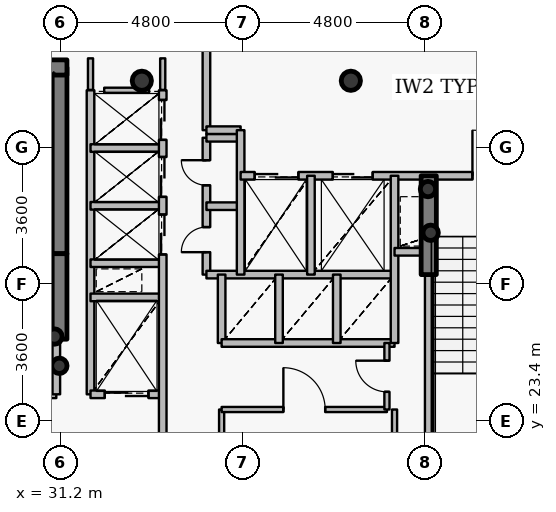
"""IFC4 building model, lengths in metres.
Left out: names, types, materials, properties, quantities, classifications, styles, units other than length and angle.
Written with IfcOpenShell. Run it as: python <this file> out.ifc"""

import sys

from ifc_helpers import new_model, si_unit, direction, frame, frame_2d, origin, origin_2d, place, context, subcontext, project, spatial, rectangle, hollow_circle, extrude, source, transform, mapped, element, fill, save


model = new_model("IFC4")
c1 = context("Model", 3, precision=1e-05, world=origin(), true_north=direction((0.0, 1.0)))
c2 = subcontext(c1, "Body", "Model", "MODEL_VIEW")
j1 = project(units=[si_unit("LENGTHUNIT", "METRE"), si_unit("PLANEANGLEUNIT", "RADIAN")], contexts=[c1])
p1 = place(None, origin())
s1 = spatial("IfcSite", under=j1, at=p1, CompositionType="ELEMENT")
p2 = place(p1, origin())
s2 = spatial("IfcBuilding", under=s1, at=p2, CompositionType="ELEMENT")
p3 = place(p2, frame((0.0, 0.0, 174.9)))
s3 = spatial("IfcBuildingStorey", under=s2, at=p3, CompositionType="ELEMENT", Elevation=174.9)
for number, where, z_axis, x_axis in (
    (1, (38.85, 32.35, 0.0), (0.0, 0.0, 1.0), (1.0, 0.0, 0.0)),
    (2, (33.35, 32.35, 0.0), (0.0, 0.0, 1.0), (1.0, 0.0, 0.0)),
):
    element("IfcColumn", number, at=place(p3, frame(where, z_axis=z_axis, x_axis=x_axis)), inside=s3, PredefinedType="COLUMN", context=c2, shape_type="SweptSolid", body=[
        extrude(hollow_circle(Radius=0.254, WallThickness=0.02, at=origin_2d()), origin(), (0.0, 0.0, 1.0), 3.75),
    ])
p4 = place(p3, frame((31.18, 27.8, 0.0), z_axis=(0.0, 0.0, 1.0), x_axis=(0.0, 1.0, 0.0)))
e3 = element("IfcWall", 3, at=p4, inside=s3, PredefinedType="SHEAR", context=c2, shape_type="SweptSolid", body=[
    extrude(rectangle(XDim=4.9, YDim=0.4, at=frame_2d((2.45, 0.0))), origin(), (0.0, 0.0, 1.0), 3.75),
])
p5 = place(p3, frame((27.28, 32.7, 0.0), z_axis=(0.0, 0.0, 1.0), x_axis=(1.0, 0.0, 0.0)))
e4 = element("IfcWall", 4, at=p5, inside=s3, PredefinedType="SHEAR", context=c2, shape_type="SweptSolid", body=[
    extrude(rectangle(XDim=4.1, YDim=0.4, at=frame_2d((2.05, 0.0))), origin(), (0.0, 0.0, 1.0), 3.75),
])
for number, where, z_axis, x_axis in (
    (5, (31.05, 25.62, 0.0), (0.0, 0.0, 1.0), (1.0, 0.0, 0.0)),
    (6, (31.18, 24.85, 0.0), (0.0, 0.0, 1.0), (1.0, 0.0, 0.0)),
    (7, (40.95, 28.35, 0.0), (0.0, 0.0, 1.0), (1.0, 0.0, 0.0)),
    (8, (40.88, 29.5, 0.0), (0.0, 0.0, 1.0), (1.0, 0.0, 0.0)),
):
    element("IfcColumn", number, at=place(p3, frame(where, z_axis=z_axis, x_axis=x_axis)), inside=s3, PredefinedType="COLUMN", context=c2, shape_type="SweptSolid", body=[
        extrude(hollow_circle(Radius=0.203, WallThickness=0.016, at=origin_2d()), origin(), (0.0, 0.0, 1.0), 3.75),
    ])
p6 = place(p3, frame((31.18, 25.55, 0.0), z_axis=(0.0, 0.0, 1.0), x_axis=(0.0, 1.0, 0.0)))
e9 = element("IfcWall", 9, at=p6, inside=s3, PredefinedType="SHEAR", context=c2, shape_type="SweptSolid", body=[
    extrude(rectangle(XDim=2.25, YDim=0.4, at=frame_2d((1.125, 0.0))), origin(), (0.0, 0.0, 1.0), 3.1),
])
p7 = place(p3, frame((40.9, 27.25, 0.0), z_axis=(0.0, 0.0, 1.0), x_axis=(0.0, 1.0, 0.0)))
e10 = element("IfcWall", 10, at=p7, inside=s3, PredefinedType="SHEAR", context=c2, shape_type="SweptSolid", body=[
    extrude(rectangle(XDim=2.6, YDim=0.4, at=frame_2d((1.3, 0.0))), origin(), (0.0, 0.0, 1.0), 3.1),
])
p8 = place(p3, frame((27.56, 24.1, 0.0), z_axis=(0.0, 0.0, 1.0), x_axis=(1.0, 0.0, 0.0)))
e11 = element("IfcWall", 11, at=p8, inside=s3, PredefinedType="PARTITIONING", context=c2, shape_type="SweptSolid", body=[
    extrude(rectangle(XDim=3.54, YDim=0.2, at=frame_2d((1.77, 0.0))), origin(), (0.0, 0.0, 1.0), 3.5),
])
p9 = place(p8, frame((1.17, 0.0, 0.0)))
e12 = element("IfcOpeningElement", 12, at=p9, cuts=e11, PredefinedType="OPENING", context=c2, shape_type="SweptSolid", body=[
    extrude(rectangle(XDim=1.2, YDim=2.15, at=origin_2d()), frame((0.6, 0.11, 1.075), z_axis=(0.0, -1.0, 0.0), x_axis=(1.0, 0.0, 0.0)), (0.0, 0.0, 1.0), 0.22),
])
p10 = place(p3, frame((31.1, 24.1, 0.0), z_axis=(0.0, 0.0, 1.0), x_axis=(0.0, 1.0, 0.0)))
e13 = element("IfcWall", 13, at=p10, inside=s3, PredefinedType="PARTITIONING", context=c2, shape_type="SweptSolid", body=[
    extrude(rectangle(XDim=1.44, YDim=0.2, at=frame_2d((0.72, 0.0))), origin(), (0.0, 0.0, 1.0), 3.5),
])
p11 = place(p3, frame((32.0, 24.1, 0.0), z_axis=(0.0, 0.0, 1.0), x_axis=(0.0, 1.0, 0.0)))
e14 = element("IfcWall", 14, at=p11, inside=s3, PredefinedType="PARTITIONING", context=c2, shape_type="SweptSolid", body=[
    extrude(rectangle(XDim=8.0, YDim=0.2, at=frame_2d((4.0, 0.0))), origin(), (0.0, 0.0, 1.0), 3.5),
])
p12 = place(p3, frame((32.0, 24.1, 0.0), z_axis=(0.0, 0.0, 1.0), x_axis=(1.0, 0.0, 0.0)))
e15 = element("IfcWall", 15, at=p12, inside=s3, PredefinedType="PARTITIONING", context=c2, shape_type="SweptSolid", body=[
    extrude(rectangle(XDim=1.9, YDim=0.2, at=frame_2d((0.95, 0.0))), origin(), (0.0, 0.0, 1.0), 3.085),
])
p13 = place(p12, frame((0.375, 0.0, 0.0)))
e16 = element("IfcOpeningElement", 16, at=p13, cuts=e15, PredefinedType="OPENING", context=c2, shape_type="SweptSolid", body=[
    extrude(rectangle(XDim=1.15, YDim=2.15, at=origin_2d()), frame((0.575, 0.11, 1.075), z_axis=(0.0, -1.0, 0.0), x_axis=(1.0, 0.0, 0.0)), (0.0, 0.0, 1.0), 0.22),
])
for number, where, z_axis, x_axis in (
    (17, (32.0, 26.65, 0.0), (0.0, 0.0, 1.0), (1.0, 0.0, 0.0)),
    (18, (32.0, 27.55, 0.0), (0.0, 0.0, 1.0), (1.0, 0.0, 0.0)),
    (19, (32.0, 29.06, 0.0), (0.0, 0.0, 1.0), (1.0, 0.0, 0.0)),
    (20, (32.0, 30.58, 0.0), (0.0, 0.0, 1.0), (1.0, 0.0, 0.0)),
):
    element("IfcWall", number, at=place(p3, frame(where, z_axis=z_axis, x_axis=x_axis)), inside=s3, PredefinedType="PARTITIONING", context=c2, shape_type="SweptSolid", body=[
        extrude(rectangle(XDim=1.9, YDim=0.2, at=frame_2d((0.95, 0.0))), origin(), (0.0, 0.0, 1.0), 3.085),
    ])
p14 = place(p3, frame((33.9, 20.8, 0.0), z_axis=(0.0, 0.0, 1.0), x_axis=(0.0, 1.0, 0.0)))
e21 = element("IfcWall", 21, at=p14, inside=s3, PredefinedType="PARTITIONING", context=c2, shape_type="SweptSolid", body=[
    extrude(rectangle(XDim=11.3, YDim=0.2, at=frame_2d((5.65, 0.0))), origin(), (0.0, 0.0, 1.0), 3.085),
])
p15 = place(p14, frame((6.98, 0.0, 0.0)))
e22 = element("IfcOpeningElement", 22, at=p15, cuts=e21, PredefinedType="OPENING", context=c2, shape_type="SweptSolid", body=[
    extrude(rectangle(XDim=1.05, YDim=2.15, at=origin_2d()), frame((0.525, 0.11, 1.075), z_axis=(0.0, -1.0, 0.0), x_axis=(1.0, 0.0, 0.0)), (0.0, 0.0, 1.0), 0.22),
])
p16 = place(p14, frame((8.495, 0.0, 0.0)))
e23 = element("IfcOpeningElement", 23, at=p16, cuts=e21, PredefinedType="OPENING", context=c2, shape_type="SweptSolid", body=[
    extrude(rectangle(XDim=1.05, YDim=2.15, at=origin_2d()), frame((0.525, 0.11, 1.075), z_axis=(0.0, -1.0, 0.0), x_axis=(1.0, 0.0, 0.0)), (0.0, 0.0, 1.0), 0.22),
])
p17 = place(p14, frame((9.995, 0.0, 0.0)))
e24 = element("IfcOpeningElement", 24, at=p17, cuts=e21, PredefinedType="OPENING", context=c2, shape_type="SweptSolid", body=[
    extrude(rectangle(XDim=1.05, YDim=2.15, at=origin_2d()), frame((0.525, 0.11, 1.075), z_axis=(0.0, -1.0, 0.0), x_axis=(1.0, 0.0, 0.0)), (0.0, 0.0, 1.0), 0.22),
])
p18 = place(p3, frame((35.05, 27.25, 0.0), z_axis=(0.0, 0.0, 1.0), x_axis=(0.0, 1.0, 0.0)))
e25 = element("IfcWall", 25, at=p18, inside=s3, PredefinedType="PARTITIONING", context=c2, shape_type="SweptSolid", body=[
    extrude(rectangle(XDim=3.6, YDim=0.2, at=frame_2d((1.8, 0.0))), origin(), (0.0, 0.0, 1.0), 3.5),
])
p19 = place(p18, frame((0.59, 0.0, 0.0)))
e26 = element("IfcOpeningElement", 26, at=p19, cuts=e25, PredefinedType="OPENING", context=c2, shape_type="SweptSolid", body=[
    extrude(rectangle(XDim=0.66, YDim=2.05, at=origin_2d()), frame((0.33, 0.11, 1.025), z_axis=(0.0, -1.0, 0.0), x_axis=(1.0, 0.0, 0.0)), (0.0, 0.0, 1.0), 0.22),
])
p20 = place(p18, frame((2.35, 0.0, 0.0)))
e27 = element("IfcOpeningElement", 27, at=p20, cuts=e25, PredefinedType="OPENING", context=c2, shape_type="SweptSolid", body=[
    extrude(rectangle(XDim=0.66, YDim=2.05, at=origin_2d()), frame((0.33, 0.11, 1.025), z_axis=(0.0, -1.0, 0.0), x_axis=(1.0, 0.0, 0.0)), (0.0, 0.0, 1.0), 0.22),
])
p21 = place(p3, frame((35.05, 27.25, 0.0), z_axis=(0.0, 0.0, 1.0), x_axis=(1.0, 0.0, 0.0)))
e28 = element("IfcWall", 28, at=p21, inside=s3, PredefinedType="PARTITIONING", context=c2, shape_type="SweptSolid", body=[
    extrude(rectangle(XDim=4.95, YDim=0.2, at=frame_2d((2.475, 0.0))), origin(), (0.0, 0.0, 1.0), 3.085),
])
for number, where, z_axis, x_axis in (
    (29, (35.05, 29.05, 0.0), (0.0, 0.0, 1.0), (1.0, 0.0, 0.0)),
    (30, (35.05, 30.85, 0.0), (0.0, 0.0, 1.0), (1.0, 0.0, 0.0)),
):
    element("IfcWall", number, at=place(p3, frame(where, z_axis=z_axis, x_axis=x_axis)), inside=s3, PredefinedType="PARTITIONING", context=c2, shape_type="SweptSolid", body=[
        extrude(rectangle(XDim=0.9, YDim=0.2, at=frame_2d((0.45, 0.0))), origin(), (0.0, 0.0, 1.0), 3.5),
    ])
p22 = place(p3, frame((35.05, 31.05, 0.0), z_axis=(0.0, 0.0, 1.0), x_axis=(0.0, 1.0, 0.0)))
e31 = element("IfcWall", 31, at=p22, inside=s3, PredefinedType="PARTITIONING", context=c2, shape_type="SweptSolid", body=[
    extrude(rectangle(XDim=2.15, YDim=0.2, at=frame_2d((1.075, 0.0))), origin(), (0.0, 0.0, 1.0), 3.085),
])
p23 = place(p3, frame((35.05, 31.05, 0.0), z_axis=(0.0, 0.0, 1.0), x_axis=(1.0, 0.0, 0.0)))
e32 = element("IfcWall", 32, at=p23, inside=s3, PredefinedType="PARTITIONING", context=c2, shape_type="SweptSolid", body=[
    extrude(rectangle(XDim=0.9, YDim=0.2, at=frame_2d((0.45, 0.0))), origin(), (0.0, 0.0, 1.0), 3.5),
])
p24 = place(p3, frame((35.45, 20.8, 0.0), z_axis=(0.0, 0.0, 1.0), x_axis=(0.0, 1.0, 0.0)))
e33 = element("IfcWall", 33, at=p24, inside=s3, PredefinedType="PARTITIONING", context=c2, shape_type="SweptSolid", body=[
    extrude(rectangle(XDim=2.9, YDim=0.135, at=frame_2d((1.45, 0.0))), origin(), (0.0, 0.0, 1.0), 3.085),
])
p25 = place(p3, frame((35.45, 23.7, 0.0), z_axis=(0.0, 0.0, 1.0), x_axis=(1.0, 0.0, 0.0)))
e34 = element("IfcWall", 34, at=p25, inside=s3, PredefinedType="PARTITIONING", context=c2, shape_type="SweptSolid", body=[
    extrude(rectangle(XDim=4.35, YDim=0.135, at=frame_2d((2.175, 0.0))), origin(), (0.0, 0.0, 1.0), 3.085),
])
p26 = place(p25, frame((1.625, 0.0, 0.0)))
e35 = element("IfcOpeningElement", 35, at=p26, cuts=e34, PredefinedType="OPENING", context=c2, shape_type="SweptSolid", body=[
    extrude(rectangle(XDim=1.1, YDim=2.15, at=origin_2d()), frame((0.55, 0.078, 1.075), z_axis=(0.0, -1.0, 0.0), x_axis=(1.0, 0.0, 0.0)), (0.0, 0.0, 1.0), 0.155),
])
p27 = place(p3, frame((35.45, 25.45, 0.0), z_axis=(0.0, 0.0, 1.0), x_axis=(0.0, 1.0, 0.0)))
e36 = element("IfcWall", 36, at=p27, inside=s3, PredefinedType="PARTITIONING", context=c2, shape_type="SweptSolid", body=[
    extrude(rectangle(XDim=1.8, YDim=0.2, at=frame_2d((0.9, 0.0))), origin(), (0.0, 0.0, 1.0), 3.5),
])
p28 = place(p3, frame((35.45, 25.45, 0.0), z_axis=(0.0, 0.0, 1.0), x_axis=(1.0, 0.0, 0.0)))
e37 = element("IfcWall", 37, at=p28, inside=s3, PredefinedType="PARTITIONING", context=c2, shape_type="SweptSolid", body=[
    extrude(rectangle(XDim=4.55, YDim=0.2, at=frame_2d((2.275, 0.0))), origin(), (0.0, 0.0, 1.0), 3.085),
])
p29 = place(p3, frame((35.95, 27.25, 0.0), z_axis=(0.0, 0.0, 1.0), x_axis=(0.0, 1.0, 0.0)))
e38 = element("IfcWall", 38, at=p29, inside=s3, PredefinedType="PARTITIONING", context=c2, shape_type="SweptSolid", body=[
    extrude(rectangle(XDim=3.8, YDim=0.2, at=frame_2d((1.9, 0.0))), origin(), (0.0, 0.0, 1.0), 3.5),
])
p30 = place(p3, frame((35.95, 29.85, 0.0), z_axis=(0.0, 0.0, 1.0), x_axis=(1.0, 0.0, 0.0)))
e39 = element("IfcWall", 39, at=p30, inside=s3, PredefinedType="PARTITIONING", context=c2, shape_type="SweptSolid", body=[
    extrude(rectangle(XDim=8.49, YDim=0.2, at=frame_2d((4.245, 0.0))), origin(), (0.0, 0.0, 1.0), 3.085),
])
p31 = place(p30, frame((6.1, 0.0, 0.0)))
e40 = element("IfcOpeningElement", 40, at=p31, cuts=e39, PredefinedType="OPENING", context=c2, shape_type="SweptSolid", body=[
    extrude(rectangle(XDim=1.2, YDim=2.15, at=origin_2d()), frame((0.6, 0.11, 1.075), z_axis=(0.0, -1.0, 0.0), x_axis=(1.0, 0.0, 0.0)), (0.0, 0.0, 1.0), 0.22),
])
p32 = place(p30, frame((0.37, 0.0, 0.0)))
e41 = element("IfcOpeningElement", 41, at=p32, cuts=e39, PredefinedType="OPENING", context=c2, shape_type="SweptSolid", body=[
    extrude(rectangle(XDim=1.15, YDim=2.15, at=origin_2d()), frame((0.575, 0.11, 1.075), z_axis=(0.0, -1.0, 0.0), x_axis=(1.0, 0.0, 0.0)), (0.0, 0.0, 1.0), 0.22),
])
p33 = place(p30, frame((2.425, 0.0, 0.0)))
e42 = element("IfcOpeningElement", 42, at=p33, cuts=e39, PredefinedType="OPENING", context=c2, shape_type="SweptSolid", body=[
    extrude(rectangle(XDim=1.05, YDim=2.15, at=origin_2d()), frame((0.525, 0.11, 1.075), z_axis=(0.0, -1.0, 0.0), x_axis=(1.0, 0.0, 0.0)), (0.0, 0.0, 1.0), 0.22),
])
p34 = place(p3, frame((36.96, 25.45, 0.0), z_axis=(0.0, 0.0, 1.0), x_axis=(0.0, 1.0, 0.0)))
e43 = element("IfcWall", 43, at=p34, inside=s3, PredefinedType="PARTITIONING", context=c2, shape_type="SweptSolid", body=[
    extrude(rectangle(XDim=1.8, YDim=0.2, at=frame_2d((0.9, 0.0))), origin(), (0.0, 0.0, 1.0), 3.5),
])
p35 = place(p3, frame((37.8, 27.25, 0.0), z_axis=(0.0, 0.0, 1.0), x_axis=(0.0, 1.0, 0.0)))
e44 = element("IfcWall", 44, at=p35, inside=s3, PredefinedType="PARTITIONING", context=c2, shape_type="SweptSolid", body=[
    extrude(rectangle(XDim=2.6, YDim=0.2, at=frame_2d((1.3, 0.0))), origin(), (0.0, 0.0, 1.0), 3.5),
])
p36 = place(p3, frame((38.48, 25.45, 0.0), z_axis=(0.0, 0.0, 1.0), x_axis=(0.0, 1.0, 0.0)))
e45 = element("IfcWall", 45, at=p36, inside=s3, PredefinedType="PARTITIONING", context=c2, shape_type="SweptSolid", body=[
    extrude(rectangle(XDim=1.8, YDim=0.2, at=frame_2d((0.9, 0.0))), origin(), (0.0, 0.0, 1.0), 3.5),
])
p37 = place(p3, frame((39.8, 23.7, 0.0), z_axis=(0.0, 0.0, 1.0), x_axis=(0.0, 1.0, 0.0)))
e46 = element("IfcWall", 46, at=p37, inside=s3, PredefinedType="PARTITIONING", context=c2, shape_type="SweptSolid", body=[
    extrude(rectangle(XDim=1.75, YDim=0.135, at=frame_2d((0.875, 0.0))), origin(), (0.0, 0.0, 1.0), 3.5),
])
p38 = place(p37, frame((0.465, 0.0, 0.0)))
e47 = element("IfcOpeningElement", 47, at=p38, cuts=e46, PredefinedType="OPENING", context=c2, shape_type="SweptSolid", body=[
    extrude(rectangle(XDim=0.82, YDim=2.1, at=origin_2d()), frame((0.41, 0.078, 1.05), z_axis=(0.0, -1.0, 0.0), x_axis=(1.0, 0.0, 0.0)), (0.0, 0.0, 1.0), 0.155),
])
p39 = place(p3, frame((40.0, 25.45, 0.0), z_axis=(0.0, 0.0, 1.0), x_axis=(0.0, 1.0, 0.0)))
e48 = element("IfcWall", 48, at=p39, inside=s3, PredefinedType="PARTITIONING", context=c2, shape_type="SweptSolid", body=[
    extrude(rectangle(XDim=4.4, YDim=0.2, at=frame_2d((2.2, 0.0))), origin(), (0.0, 0.0, 1.0), 3.5),
])
p40 = place(p3, frame((40.0, 27.85, 0.0), z_axis=(0.0, 0.0, 1.0), x_axis=(1.0, 0.0, 0.0)))
e49 = element("IfcWall", 49, at=p40, inside=s3, PredefinedType="PARTITIONING", context=c2, shape_type="SweptSolid", body=[
    extrude(rectangle(XDim=0.9, YDim=0.2, at=frame_2d((0.45, 0.0))), origin(), (0.0, 0.0, 1.0), 3.5),
])
p41 = place(p3, frame((40.9, 21.33, 0.0), z_axis=(0.0, 0.0, 1.0), x_axis=(0.0, 1.0, 0.0)))
e50 = element("IfcWall", 50, at=p41, inside=s3, PredefinedType="PARTITIONING", context=c2, shape_type="SweptSolid", body=[
    extrude(rectangle(XDim=5.91, YDim=0.2, at=frame_2d((2.955, 0.0))), origin(), (0.0, 0.0, 1.0), 3.035),
])
p42 = place(p3, frame((32.36, 32.1, 0.0), z_axis=(0.0, 0.0, 1.0), x_axis=(1.0, 0.0, 0.0)))
e51 = element("IfcWall", 51, at=p42, inside=s3, PredefinedType="PARTITIONING", context=c2, shape_type="SweptSolid", body=[
    extrude(rectangle(XDim=1.18, YDim=0.135, at=frame_2d((0.59, 0.0))), origin(), (0.0, 0.0, 1.0), 3.085),
])
p43 = place(p3, frame((40.0, 23.7, 0.0), z_axis=(0.0, 0.0, 1.0), x_axis=(0.0, -1.0, 0.0)))
e52 = element("IfcWall", 52, at=p43, inside=s3, PredefinedType="PARTITIONING", context=c2, shape_type="SweptSolid", body=[
    extrude(rectangle(XDim=2.64, YDim=0.135, at=frame_2d((1.32, 0.0))), origin(), (0.0, 0.0, 1.0), 3.035),
])
p44 = place(p3, frame((32.0, 32.94, 0.0), z_axis=(0.0, 0.0, 1.0), x_axis=(0.0, -1.0, 0.0)))
e53 = element("IfcWall", 53, at=p44, inside=s3, PredefinedType="PARTITIONING", context=c2, shape_type="SweptSolid", body=[
    extrude(rectangle(XDim=0.83, YDim=0.135, at=frame_2d((0.415, 0.0))), origin(), (0.0, 0.0, 1.0), 3.035),
])
p45 = place(p3, frame((33.9, 32.11, 0.0), z_axis=(0.0, 0.0, 1.0), x_axis=(0.0, 1.0, 0.0)))
e54 = element("IfcWall", 54, at=p45, inside=s3, PredefinedType="PARTITIONING", context=c2, shape_type="SweptSolid", body=[
    extrude(rectangle(XDim=0.83, YDim=0.135, at=frame_2d((0.415, 0.0))), origin(), (0.0, 0.0, 1.0), 3.085),
])
m1 = source(origin(), c2, "Body", "SweptSolid", [
    extrude(rectangle(XDim=1.2, YDim=2.15, at=origin_2d()), frame((0.6, 0.025, 1.075), z_axis=(0.0, -1.0, 0.0), x_axis=(1.0, 0.0, 0.0)), (0.0, 0.0, 1.0), 0.05),
])
p46 = place(p31, origin())
e55 = element("IfcDoor", 55, at=p46, inside=s3, OperationType="SINGLE_SWING_LEFT", PredefinedType="DOOR", context=c2, shape_type="MappedRepresentation", body=[
    mapped(m1, transform((0.0, 0.0, 0.0), x_axis=(1.0, 0.0, 0.0), y_axis=(0.0, 1.0, 0.0), z_axis=(0.0, 0.0, 1.0), scale=1.0)),
])
fill(e40, e55)
m2 = source(origin(), c2, "Body", "SweptSolid", [
    extrude(rectangle(XDim=1.15, YDim=2.15, at=origin_2d()), frame((0.575, 0.025, 1.075), z_axis=(0.0, -1.0, 0.0), x_axis=(1.0, 0.0, 0.0)), (0.0, 0.0, 1.0), 0.05),
])
p47 = place(p32, origin())
e56 = element("IfcDoor", 56, at=p47, inside=s3, OperationType="DOUBLE_DOOR_SLIDING", PredefinedType="USERDEFINED", context=c2, shape_type="MappedRepresentation", body=[
    mapped(m2, transform((0.0, 0.0, 0.0), x_axis=(1.0, 0.0, 0.0), y_axis=(0.0, 1.0, 0.0), z_axis=(0.0, 0.0, 1.0), scale=1.0)),
])
fill(e41, e56)
p48 = place(p13, origin())
e57 = element("IfcDoor", 57, at=p48, inside=s3, OperationType="DOUBLE_DOOR_SLIDING", PredefinedType="USERDEFINED", context=c2, shape_type="MappedRepresentation", body=[
    mapped(m2, transform((0.0, 0.0, 0.0), x_axis=(1.0, 0.0, 0.0), y_axis=(0.0, 1.0, 0.0), z_axis=(0.0, 0.0, 1.0), scale=1.0)),
])
fill(e16, e57)
m3 = source(origin(), c2, "Body", "SweptSolid", [
    extrude(rectangle(XDim=1.05, YDim=2.15, at=origin_2d()), frame((0.525, 0.025, 1.075), z_axis=(0.0, -1.0, 0.0), x_axis=(1.0, 0.0, 0.0)), (0.0, 0.0, 1.0), 0.05),
])
p49 = place(p33, origin())
e58 = element("IfcDoor", 58, at=p49, inside=s3, OperationType="DOUBLE_DOOR_SLIDING", PredefinedType="USERDEFINED", context=c2, shape_type="MappedRepresentation", body=[
    mapped(m3, transform((0.0, 0.0, 0.0), x_axis=(1.0, 0.0, 0.0), y_axis=(0.0, 1.0, 0.0), z_axis=(0.0, 0.0, 1.0), scale=1.0)),
])
fill(e42, e58)
p50 = place(p15, origin())
e59 = element("IfcDoor", 59, at=p50, inside=s3, OperationType="DOUBLE_DOOR_SLIDING", PredefinedType="USERDEFINED", context=c2, shape_type="MappedRepresentation", body=[
    mapped(m3, transform((0.0, 0.0, 0.0), x_axis=(1.0, 0.0, 0.0), y_axis=(0.0, 1.0, 0.0), z_axis=(0.0, 0.0, 1.0), scale=1.0)),
])
fill(e22, e59)
p51 = place(p16, origin())
e60 = element("IfcDoor", 60, at=p51, inside=s3, OperationType="DOUBLE_DOOR_SLIDING", PredefinedType="USERDEFINED", context=c2, shape_type="MappedRepresentation", body=[
    mapped(m3, transform((0.0, 0.0, 0.0), x_axis=(1.0, 0.0, 0.0), y_axis=(0.0, 1.0, 0.0), z_axis=(0.0, 0.0, 1.0), scale=1.0)),
])
fill(e23, e60)
p52 = place(p17, origin())
e61 = element("IfcDoor", 61, at=p52, inside=s3, OperationType="DOUBLE_DOOR_SLIDING", PredefinedType="USERDEFINED", context=c2, shape_type="MappedRepresentation", body=[
    mapped(m3, transform((0.0, 0.0, 0.0), x_axis=(1.0, 0.0, 0.0), y_axis=(0.0, 1.0, 0.0), z_axis=(0.0, 0.0, 1.0), scale=1.0)),
])
fill(e24, e61)
m4 = source(origin(), c2, "Body", "SweptSolid", [
    extrude(rectangle(XDim=0.66, YDim=2.05, at=origin_2d()), frame((0.33, 0.025, 1.025), z_axis=(0.0, -1.0, 0.0), x_axis=(1.0, 0.0, 0.0)), (0.0, 0.0, 1.0), 0.05),
])
p53 = place(p19, origin())
e62 = element("IfcDoor", 62, at=p53, inside=s3, OperationType="SINGLE_SWING_LEFT", PredefinedType="USERDEFINED", context=c2, shape_type="MappedRepresentation", body=[
    mapped(m4, transform((0.0, 0.0, 0.0), x_axis=(1.0, 0.0, 0.0), y_axis=(0.0, 1.0, 0.0), z_axis=(0.0, 0.0, 1.0), scale=1.0)),
])
fill(e26, e62)
p54 = place(p20, origin())
e63 = element("IfcDoor", 63, at=p54, inside=s3, OperationType="SINGLE_SWING_RIGHT", PredefinedType="USERDEFINED", context=c2, shape_type="MappedRepresentation", body=[
    mapped(m4, transform((0.0, 0.0, 0.0), x_axis=(1.0, 0.0, 0.0), y_axis=(0.0, 1.0, 0.0), z_axis=(0.0, 0.0, 1.0), scale=1.0)),
])
fill(e27, e63)
m5 = source(origin(), c2, "Body", "SweptSolid", [
    extrude(rectangle(XDim=1.1, YDim=2.15, at=origin_2d()), frame((0.55, 0.025, 1.075), z_axis=(0.0, -1.0, 0.0), x_axis=(1.0, 0.0, 0.0)), (0.0, 0.0, 1.0), 0.05),
])
p55 = place(p26, origin())
e64 = element("IfcDoor", 64, at=p55, inside=s3, OperationType="SINGLE_SWING_LEFT", PredefinedType="DOOR", context=c2, shape_type="MappedRepresentation", body=[
    mapped(m5, transform((0.0, 0.0, 0.0), x_axis=(1.0, 0.0, 0.0), y_axis=(0.0, 1.0, 0.0), z_axis=(0.0, 0.0, 1.0), scale=1.0)),
])
fill(e35, e64)
m6 = source(origin(), c2, "Body", "SweptSolid", [
    extrude(rectangle(XDim=0.82, YDim=2.1, at=origin_2d()), frame((0.41, 0.025, 1.05), z_axis=(0.0, -1.0, 0.0), x_axis=(1.0, 0.0, 0.0)), (0.0, 0.0, 1.0), 0.05),
])
p56 = place(p38, origin())
e65 = element("IfcDoor", 65, at=p56, inside=s3, OperationType="SINGLE_SWING_RIGHT", PredefinedType="DOOR", context=c2, shape_type="MappedRepresentation", body=[
    mapped(m6, transform((0.0, 0.0, 0.0), x_axis=(1.0, 0.0, 0.0), y_axis=(0.0, 1.0, 0.0), z_axis=(0.0, 0.0, 1.0), scale=1.0)),
])
fill(e47, e65)
save(model, sys.argv[1])
